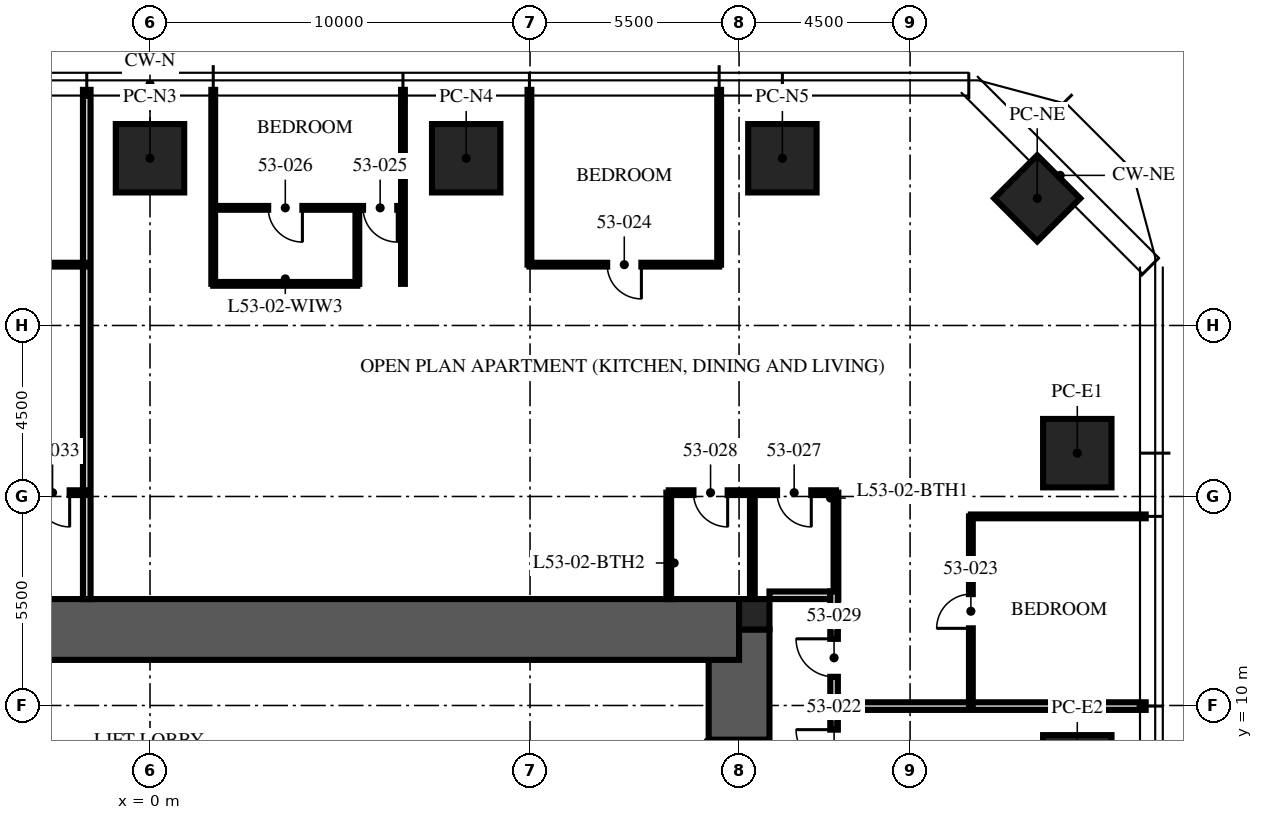
"""IFC4 building model, lengths in metres.
Left out: names, types, materials, properties, quantities, classifications, styles, units other than length and angle.
Written with IfcOpenShell. Run it as: python <this file> out.ifc"""

import sys

from ifc_helpers import new_model, si_unit, direction, frame, frame_2d, origin, origin_2d, place, context, subcontext, project, spatial, rectangle, extrude, element, fill, save


model = new_model("IFC4")
c1 = context("Model", 3, precision=1e-05, world=origin(), true_north=direction((0.0, 1.0)))
c2 = subcontext(c1, "Body", "Model", "MODEL_VIEW")
j1 = project(units=[si_unit("LENGTHUNIT", "METRE"), si_unit("PLANEANGLEUNIT", "RADIAN")], contexts=[c1])
p1 = place(None, origin())
s1 = spatial("IfcSite", under=j1, at=p1, CompositionType="ELEMENT")
p2 = place(p1, origin())
s2 = spatial("IfcBuilding", under=s1, at=p2, CompositionType="ELEMENT")
p3 = place(p2, frame((0.0, 0.0, 214.5)))
s3 = spatial("IfcBuildingStorey", under=s2, at=p3, CompositionType="ELEMENT", Elevation=214.5)
p4 = place(p3, frame((15.5, -12.0, -0.25), z_axis=(0.0, 0.0, 1.0), x_axis=(0.0, 1.0, 0.0)))
e1 = element("IfcWall", 1, at=p4, inside=s3, PredefinedType="SHEAR", context=c2, shape_type="SweptSolid", body=[
    extrude(rectangle(XDim=24.0, YDim=1.6, at=frame_2d((12.0, 0.0))), origin(), (0.0, 0.0, 1.0), 3.75),
])
p5 = place(p4, frame((3.2, 0.0, 0.25)))
e2 = element("IfcOpeningElement", 2, at=p5, cuts=e1, PredefinedType="OPENING", context=c2, shape_type="SweptSolid", body=[
    extrude(rectangle(XDim=1.2, YDim=2.1, at=frame_2d((0.6, 1.05))), frame((0.0, 0.81, 0.0), z_axis=(0.0, -1.0, 0.0), x_axis=(1.0, 0.0, 0.0)), (0.0, 0.0, 1.0), 1.62),
])
p6 = place(p4, frame((19.3, 0.0, 0.25)))
e3 = element("IfcOpeningElement", 3, at=p6, cuts=e1, PredefinedType="OPENING", context=c2, shape_type="SweptSolid", body=[
    extrude(rectangle(XDim=1.8, YDim=2.1, at=frame_2d((0.9, 1.05))), frame((0.0, 0.81, 0.0), z_axis=(0.0, -1.0, 0.0), x_axis=(1.0, 0.0, 0.0)), (0.0, 0.0, 1.0), 1.62),
])
p7 = place(p3, frame((-15.5, 12.0, -0.25), z_axis=(0.0, 0.0, 1.0), x_axis=(1.0, 0.0, 0.0)))
e4 = element("IfcWall", 4, at=p7, inside=s3, PredefinedType="SHEAR", context=c2, shape_type="SweptSolid", body=[
    extrude(rectangle(XDim=31.0, YDim=1.6, at=frame_2d((15.5, 0.0))), origin(), (0.0, 0.0, 1.0), 3.75),
])
p8 = place(p3, frame((15.9, 12.4, -0.25), z_axis=(0.0, 0.0, 1.0), x_axis=(1.0, 0.0, 0.0)))
e5 = element("IfcColumn", 5, at=p8, inside=s3, PredefinedType="COLUMN", context=c2, shape_type="SweptSolid", body=[
    extrude(rectangle(XDim=0.8, YDim=0.8, at=origin_2d()), origin(), (0.0, 0.0, 1.0), 3.75),
])
for number, where, z_axis, x_axis in (
    (6, (0.0, 24.4, 0.0), (0.0, 0.0, 1.0), (1.0, 0.0, 0.0)),
    (7, (8.32, 24.4, 0.0), (0.0, 0.0, 1.0), (1.0, 0.0, 0.0)),
    (8, (16.64, 24.4, 0.0), (0.0, 0.0, 1.0), (1.0, 0.0, 0.0)),
    (9, (24.4, 16.64, 0.0), (0.0, 0.0, 1.0), (0.0, 1.0, 0.0)),
    (10, (24.4, 8.32, 0.0), (0.0, 0.0, 1.0), (0.0, 1.0, 0.0)),
):
    element("IfcColumn", number, at=place(p3, frame(where, z_axis=z_axis, x_axis=x_axis)), inside=s3, PredefinedType="COLUMN", context=c2, shape_type="SweptSolid", body=[
        extrude(rectangle(XDim=1.8, YDim=1.8, at=origin_2d()), origin(), (0.0, 0.0, 1.0), 3.75),
    ])
p9 = place(p3, frame((23.346, 23.346, 0.0), z_axis=(0.0, 0.0, 1.0), x_axis=(0.707106781187, -0.707106781187, 0.0)))
e11 = element("IfcColumn", 11, at=p9, inside=s3, PredefinedType="COLUMN", context=c2, shape_type="SweptSolid", body=[
    extrude(rectangle(XDim=1.6, YDim=1.6, at=origin_2d()), origin(), (0.0, 0.0, 1.0), 3.75),
])
p10 = place(p3, frame((16.3, 12.9, 0.0), z_axis=(0.0, 0.0, 1.0), x_axis=(1.0, 0.0, 0.0)))
e12 = element("IfcWall", 12, at=p10, inside=s3, PredefinedType="PARTITIONING", context=c2, shape_type="SweptSolid", body=[
    extrude(rectangle(XDim=1.6, YDim=0.2, at=frame_2d((0.8, 0.0))), origin(), (0.0, 0.0, 1.0), 2.3),
])
p11 = place(p3, frame((18.1, 9.984, 0.0), z_axis=(0.0, 0.0, 1.0), x_axis=(1.0, 0.0, 0.0)))
e13 = element("IfcWall", 13, at=p11, inside=s3, PredefinedType="PARTITIONING", context=c2, shape_type="SweptSolid", body=[
    extrude(rectangle(XDim=8.1, YDim=0.2, at=frame_2d((4.05, 0.0))), origin(), (0.0, 0.0, 1.0), 2.91),
])
for number, where, z_axis, x_axis in (
    (14, (21.6, 14.976, 0.0), (0.0, 0.0, 1.0), (1.0, 0.0, 0.0)),
    (15, (14.976, 21.6, 0.0), (0.0, 0.0, 1.0), (0.0, 1.0, 0.0)),
    (16, (9.984, 21.6, 0.0), (0.0, 0.0, 1.0), (0.0, 1.0, 0.0)),
):
    element("IfcWall", number, at=place(p3, frame(where, z_axis=z_axis, x_axis=x_axis)), inside=s3, PredefinedType="PARTITIONING", context=c2, shape_type="SweptSolid", body=[
        extrude(rectangle(XDim=4.6, YDim=0.1, at=frame_2d((2.3, 0.0))), origin(), (0.0, 0.0, 1.0), 2.91),
    ])
for number, where, z_axis, x_axis in (
    (17, (6.656, 21.095, 0.0), (0.0, 0.0, 1.0), (0.0, 1.0, 0.0)),
    (18, (1.664, 21.095, 0.0), (0.0, 0.0, 1.0), (0.0, 1.0, 0.0)),
):
    element("IfcWall", number, at=place(p3, frame(where, z_axis=z_axis, x_axis=x_axis)), inside=s3, PredefinedType="PARTITIONING", context=c2, shape_type="SweptSolid", body=[
        extrude(rectangle(XDim=5.105, YDim=0.1, at=frame_2d((2.552, 0.0))), origin(), (0.0, 0.0, 1.0), 2.91),
    ])
p12 = place(p3, frame((-1.664, 12.8, 0.0), z_axis=(0.0, 0.0, 1.0), x_axis=(0.0, 1.0, 0.0)))
e19 = element("IfcWall", 19, at=p12, inside=s3, PredefinedType="PARTITIONING", context=c2, shape_type="SweptSolid", body=[
    extrude(rectangle(XDim=13.4, YDim=0.2, at=frame_2d((6.7, 0.0))), origin(), (0.0, 0.0, 1.0), 2.91),
])
p13 = place(p3, frame((21.6, 9.984, 0.0), z_axis=(0.0, 0.0, 1.0), x_axis=(0.0, 1.0, 0.0)))
e20 = element("IfcWall", 20, at=p13, inside=s3, PredefinedType="PARTITIONING", context=c2, shape_type="SweptSolid", body=[
    extrude(rectangle(XDim=4.992, YDim=0.1, at=frame_2d((2.496, 0.0))), origin(), (0.0, 0.0, 1.0), 2.81),
])
p14 = place(p13, frame((2.046, 0.0, 0.0)))
e21 = element("IfcOpeningElement", 21, at=p14, cuts=e20, PredefinedType="OPENING", context=c2, shape_type="SweptSolid", body=[
    extrude(rectangle(XDim=0.9, YDim=2.1, at=frame_2d((0.45, 1.05))), frame((0.0, 0.06, 0.0), z_axis=(0.0, -1.0, 0.0), x_axis=(1.0, 0.0, 0.0)), (0.0, 0.0, 1.0), 0.12),
])
p15 = place(p3, frame((14.976, 21.6, 0.0), z_axis=(0.0, 0.0, 1.0), x_axis=(-1.0, 0.0, 0.0)))
e22 = element("IfcWall", 22, at=p15, inside=s3, PredefinedType="PARTITIONING", context=c2, shape_type="SweptSolid", body=[
    extrude(rectangle(XDim=4.992, YDim=0.1, at=frame_2d((2.496, 0.0))), origin(), (0.0, 0.0, 1.0), 2.81),
])
p16 = place(p15, frame((2.046, 0.0, 0.0)))
e23 = element("IfcOpeningElement", 23, at=p16, cuts=e22, PredefinedType="OPENING", context=c2, shape_type="SweptSolid", body=[
    extrude(rectangle(XDim=0.9, YDim=2.1, at=frame_2d((0.45, 1.05))), frame((0.0, 0.06, 0.0), z_axis=(0.0, -1.0, 0.0), x_axis=(1.0, 0.0, 0.0)), (0.0, 0.0, 1.0), 0.12),
])
p17 = place(p3, frame((6.656, 23.095, 0.0), z_axis=(0.0, 0.0, 1.0), x_axis=(-1.0, 0.0, 0.0)))
e24 = element("IfcWall", 24, at=p17, inside=s3, PredefinedType="PARTITIONING", context=c2, shape_type="SweptSolid", body=[
    extrude(rectangle(XDim=4.992, YDim=0.1, at=frame_2d((2.496, 0.0))), origin(), (0.0, 0.0, 1.0), 2.81),
])
p18 = place(p17, frame((0.15, 0.0, 0.0)))
e25 = element("IfcOpeningElement", 25, at=p18, cuts=e24, PredefinedType="OPENING", context=c2, shape_type="SweptSolid", body=[
    extrude(rectangle(XDim=0.9, YDim=2.1, at=frame_2d((0.45, 1.05))), frame((0.0, 0.06, 0.0), z_axis=(0.0, -1.0, 0.0), x_axis=(1.0, 0.0, 0.0)), (0.0, 0.0, 1.0), 0.12),
])
p19 = place(p17, frame((2.646, 0.0, 0.0)))
e26 = element("IfcOpeningElement", 26, at=p19, cuts=e24, PredefinedType="OPENING", context=c2, shape_type="SweptSolid", body=[
    extrude(rectangle(XDim=0.9, YDim=2.1, at=frame_2d((0.45, 1.05))), frame((0.0, 0.06, 0.0), z_axis=(0.0, -1.0, 0.0), x_axis=(1.0, 0.0, 0.0)), (0.0, 0.0, 1.0), 0.12),
])
p20 = place(p3, frame((5.456, 21.095, 0.0), z_axis=(0.0, 0.0, 1.0), x_axis=(0.0, 1.0, 0.0)))
e27 = element("IfcWall", 27, at=p20, inside=s3, PredefinedType="PARTITIONING", context=c2, shape_type="SweptSolid", body=[
    extrude(rectangle(XDim=2.0, YDim=0.1, at=frame_2d((1.0, 0.0))), origin(), (0.0, 0.0, 1.0), 3.5),
])
p21 = place(p3, frame((5.456, 21.095, 0.0), z_axis=(0.0, 0.0, 1.0), x_axis=(-1.0, 0.0, 0.0)))
e28 = element("IfcWall", 28, at=p21, inside=s3, PredefinedType="PARTITIONING", context=c2, shape_type="SweptSolid", body=[
    extrude(rectangle(XDim=3.792, YDim=0.1, at=frame_2d((1.896, 0.0))), origin(), (0.0, 0.0, 1.0), 2.81),
])
p22 = place(p3, frame((18.05, 15.6, 0.0), z_axis=(0.0, 0.0, 1.0), x_axis=(-1.0, 0.0, 0.0)))
e29 = element("IfcWall", 29, at=p22, inside=s3, PredefinedType="PARTITIONING", context=c2, shape_type="SweptSolid", body=[
    extrude(rectangle(XDim=4.4, YDim=0.125, at=frame_2d((2.2, 0.0))), origin(), (0.0, 0.0, 1.0), 2.3),
])
p23 = place(p22, frame((0.65, 0.0, 0.0)))
e30 = element("IfcOpeningElement", 30, at=p23, cuts=e29, PredefinedType="OPENING", context=c2, shape_type="SweptSolid", body=[
    extrude(rectangle(XDim=0.9, YDim=2.1, at=frame_2d((0.45, 1.05))), frame((0.0, 0.073, 0.0), z_axis=(0.0, -1.0, 0.0), x_axis=(1.0, 0.0, 0.0)), (0.0, 0.0, 1.0), 0.145),
])
p24 = place(p22, frame((2.85, 0.0, 0.0)))
e31 = element("IfcOpeningElement", 31, at=p24, cuts=e29, PredefinedType="OPENING", context=c2, shape_type="SweptSolid", body=[
    extrude(rectangle(XDim=0.9, YDim=2.1, at=frame_2d((0.45, 1.05))), frame((0.0, 0.073, 0.0), z_axis=(0.0, -1.0, 0.0), x_axis=(1.0, 0.0, 0.0)), (0.0, 0.0, 1.0), 0.145),
])
for number, where, z_axis, x_axis in (
    (32, (18.05, 12.8, 0.0), (0.0, 0.0, 1.0), (0.0, 1.0, 0.0)),
    (33, (15.85, 12.8, 0.0), (0.0, 0.0, 1.0), (0.0, 1.0, 0.0)),
):
    element("IfcWall", number, at=place(p3, frame(where, z_axis=z_axis, x_axis=x_axis)), inside=s3, PredefinedType="PARTITIONING", context=c2, shape_type="SweptSolid", body=[
        extrude(rectangle(XDim=2.8, YDim=0.125, at=frame_2d((1.4, 0.0))), origin(), (0.0, 0.0, 1.0), 2.3),
    ])
p25 = place(p3, frame((13.65, 12.8, 0.0), z_axis=(0.0, 0.0, 1.0), x_axis=(0.0, 1.0, 0.0)))
e34 = element("IfcWall", 34, at=p25, inside=s3, PredefinedType="PARTITIONING", context=c2, shape_type="SweptSolid", body=[
    extrude(rectangle(XDim=2.8, YDim=0.125, at=frame_2d((1.4, 0.0))), origin(), (0.0, 0.0, 1.0), 3.5),
])
p26 = place(p3, frame((-1.664, 21.6, 0.0), z_axis=(0.0, 0.0, 1.0), x_axis=(-1.0, 0.0, 0.0)))
e35 = element("IfcWall", 35, at=p26, inside=s3, PredefinedType="PARTITIONING", context=c2, shape_type="SweptSolid", body=[
    extrude(rectangle(XDim=4.992, YDim=0.1, at=frame_2d((2.496, 0.0))), origin(), (0.0, 0.0, 1.0), 2.81),
])
p27 = place(p26, frame((2.046, 0.0, 0.0)))
e36 = element("IfcOpeningElement", 36, at=p27, cuts=e35, PredefinedType="OPENING", context=c2, shape_type="SweptSolid", body=[
    extrude(rectangle(XDim=0.9, YDim=2.1, at=frame_2d((0.45, 1.05))), frame((0.0, 0.06, 0.0), z_axis=(0.0, -1.0, 0.0), x_axis=(1.0, 0.0, 0.0)), (0.0, 0.0, 1.0), 0.12),
])
p28 = place(p3, frame((-1.664, 15.6, 0.0), z_axis=(0.0, 0.0, 1.0), x_axis=(-1.0, 0.0, 0.0)))
e37 = element("IfcWall", 37, at=p28, inside=s3, PredefinedType="PARTITIONING", context=c2, shape_type="SweptSolid", body=[
    extrude(rectangle(XDim=1.8, YDim=0.125, at=frame_2d((0.9, 0.0))), origin(), (0.0, 0.0, 1.0), 3.5),
])
p29 = place(p28, frame((0.45, 0.0, 0.0)))
e38 = element("IfcOpeningElement", 38, at=p29, cuts=e37, PredefinedType="OPENING", context=c2, shape_type="SweptSolid", body=[
    extrude(rectangle(XDim=0.9, YDim=2.1, at=frame_2d((0.45, 1.05))), frame((0.0, 0.073, 0.0), z_axis=(0.0, -1.0, 0.0), x_axis=(1.0, 0.0, 0.0)), (0.0, 0.0, 1.0), 0.145),
])
p30 = place(p3, frame((18.0, -13.0, 0.0), z_axis=(0.0, 0.0, 1.0), x_axis=(0.0, 1.0, 0.0)))
e39 = element("IfcWall", 39, at=p30, inside=s3, PredefinedType="PARTITIONING", context=c2, shape_type="SweptSolid", body=[
    extrude(rectangle(XDim=26.0, YDim=0.2, at=frame_2d((13.0, 0.0))), origin(), (0.0, 0.0, 1.0), 2.6),
])
p31 = place(p30, frame((21.364, 0.0, 0.0)))
e40 = element("IfcOpeningElement", 40, at=p31, cuts=e39, PredefinedType="OPENING", context=c2, shape_type="SweptSolid", body=[
    extrude(rectangle(XDim=1.0, YDim=2.2, at=frame_2d((0.5, 1.1))), frame((0.0, 0.11, 0.0), z_axis=(0.0, -1.0, 0.0), x_axis=(1.0, 0.0, 0.0)), (0.0, 0.0, 1.0), 0.22),
])
p32 = place(p30, frame((23.754, 0.0, 0.0)))
e41 = element("IfcOpeningElement", 41, at=p32, cuts=e39, PredefinedType="OPENING", context=c2, shape_type="SweptSolid", body=[
    extrude(rectangle(XDim=1.0, YDim=2.2, at=frame_2d((0.5, 1.1))), frame((0.0, 0.11, 0.0), z_axis=(0.0, -1.0, 0.0), x_axis=(1.0, 0.0, 0.0)), (0.0, 0.0, 1.0), 0.22),
])
p33 = place(p30, frame((4.6, 0.0, 0.0)))
e42 = element("IfcOpeningElement", 42, at=p33, cuts=e39, PredefinedType="OPENING", context=c2, shape_type="SweptSolid", body=[
    extrude(rectangle(XDim=1.0, YDim=2.2, at=frame_2d((0.5, 1.1))), frame((0.0, 0.11, 0.0), z_axis=(0.0, -1.0, 0.0), x_axis=(1.0, 0.0, 0.0)), (0.0, 0.0, 1.0), 0.22),
])
p34 = place(p6, origin())
e43 = element("IfcDoor", 43, at=p34, inside=s3, OperationType="DOUBLE_DOOR_SINGLE_SWING", PredefinedType="DOOR", context=c2, shape_type="SweptSolid", body=[
    extrude(rectangle(XDim=1.8, YDim=2.1, at=frame_2d((0.9, 1.05))), frame((0.0, 0.025, 0.0), z_axis=(0.0, -1.0, 0.0), x_axis=(1.0, 0.0, 0.0)), (0.0, 0.0, 1.0), 0.05),
])
fill(e3, e43)
p35 = place(p31, origin())
e44 = element("IfcDoor", 44, at=p35, inside=s3, OperationType="SINGLE_SWING_RIGHT", PredefinedType="DOOR", context=c2, shape_type="SweptSolid", body=[
    extrude(rectangle(XDim=1.0, YDim=2.2, at=frame_2d((0.5, 1.1))), frame((0.0, 0.025, 0.0), z_axis=(0.0, -1.0, 0.0), x_axis=(1.0, 0.0, 0.0)), (0.0, 0.0, 1.0), 0.05),
])
fill(e40, e44)
p36 = place(p14, origin())
e45 = element("IfcDoor", 45, at=p36, inside=s3, OperationType="SINGLE_SWING_LEFT", PredefinedType="DOOR", context=c2, shape_type="SweptSolid", body=[
    extrude(rectangle(XDim=0.9, YDim=2.1, at=frame_2d((0.45, 1.05))), frame((0.0, 0.025, 0.0), z_axis=(0.0, -1.0, 0.0), x_axis=(1.0, 0.0, 0.0)), (0.0, 0.0, 1.0), 0.05),
])
fill(e21, e45)
p37 = place(p16, origin())
e46 = element("IfcDoor", 46, at=p37, inside=s3, OperationType="SINGLE_SWING_LEFT", PredefinedType="DOOR", context=c2, shape_type="SweptSolid", body=[
    extrude(rectangle(XDim=0.9, YDim=2.1, at=frame_2d((0.45, 1.05))), frame((0.0, 0.025, 0.0), z_axis=(0.0, -1.0, 0.0), x_axis=(1.0, 0.0, 0.0)), (0.0, 0.0, 1.0), 0.05),
])
fill(e23, e46)
p38 = place(p18, origin())
e47 = element("IfcDoor", 47, at=p38, inside=s3, OperationType="SINGLE_SWING_LEFT", PredefinedType="DOOR", context=c2, shape_type="SweptSolid", body=[
    extrude(rectangle(XDim=0.9, YDim=2.1, at=frame_2d((0.45, 1.05))), frame((0.0, 0.025, 0.0), z_axis=(0.0, -1.0, 0.0), x_axis=(1.0, 0.0, 0.0)), (0.0, 0.0, 1.0), 0.05),
])
fill(e25, e47)
p39 = place(p19, origin())
e48 = element("IfcDoor", 48, at=p39, inside=s3, OperationType="SINGLE_SWING_LEFT", PredefinedType="DOOR", context=c2, shape_type="SweptSolid", body=[
    extrude(rectangle(XDim=0.9, YDim=2.1, at=frame_2d((0.45, 1.05))), frame((0.0, 0.025, 0.0), z_axis=(0.0, -1.0, 0.0), x_axis=(1.0, 0.0, 0.0)), (0.0, 0.0, 1.0), 0.05),
])
fill(e26, e48)
p40 = place(p23, origin())
e49 = element("IfcDoor", 49, at=p40, inside=s3, OperationType="SINGLE_SWING_LEFT", PredefinedType="DOOR", context=c2, shape_type="SweptSolid", body=[
    extrude(rectangle(XDim=0.9, YDim=2.1, at=frame_2d((0.45, 1.05))), frame((0.0, 0.025, 0.0), z_axis=(0.0, -1.0, 0.0), x_axis=(1.0, 0.0, 0.0)), (0.0, 0.0, 1.0), 0.05),
])
fill(e30, e49)
p41 = place(p24, origin())
e50 = element("IfcDoor", 50, at=p41, inside=s3, OperationType="SINGLE_SWING_LEFT", PredefinedType="DOOR", context=c2, shape_type="SweptSolid", body=[
    extrude(rectangle(XDim=0.9, YDim=2.1, at=frame_2d((0.45, 1.05))), frame((0.0, 0.025, 0.0), z_axis=(0.0, -1.0, 0.0), x_axis=(1.0, 0.0, 0.0)), (0.0, 0.0, 1.0), 0.05),
])
fill(e31, e50)
p42 = place(p32, origin())
e51 = element("IfcDoor", 51, at=p42, inside=s3, OperationType="SINGLE_SWING_RIGHT", PredefinedType="DOOR", context=c2, shape_type="SweptSolid", body=[
    extrude(rectangle(XDim=1.0, YDim=2.2, at=frame_2d((0.5, 1.1))), frame((0.0, 0.025, 0.0), z_axis=(0.0, -1.0, 0.0), x_axis=(1.0, 0.0, 0.0)), (0.0, 0.0, 1.0), 0.05),
])
fill(e41, e51)
p43 = place(p29, origin())
e52 = element("IfcDoor", 52, at=p43, inside=s3, OperationType="SINGLE_SWING_LEFT", PredefinedType="DOOR", context=c2, shape_type="SweptSolid", body=[
    extrude(rectangle(XDim=0.9, YDim=2.1, at=frame_2d((0.45, 1.05))), frame((0.0, 0.025, 0.0), z_axis=(0.0, -1.0, 0.0), x_axis=(1.0, 0.0, 0.0)), (0.0, 0.0, 1.0), 0.05),
])
fill(e38, e52)
save(model, sys.argv[1])
